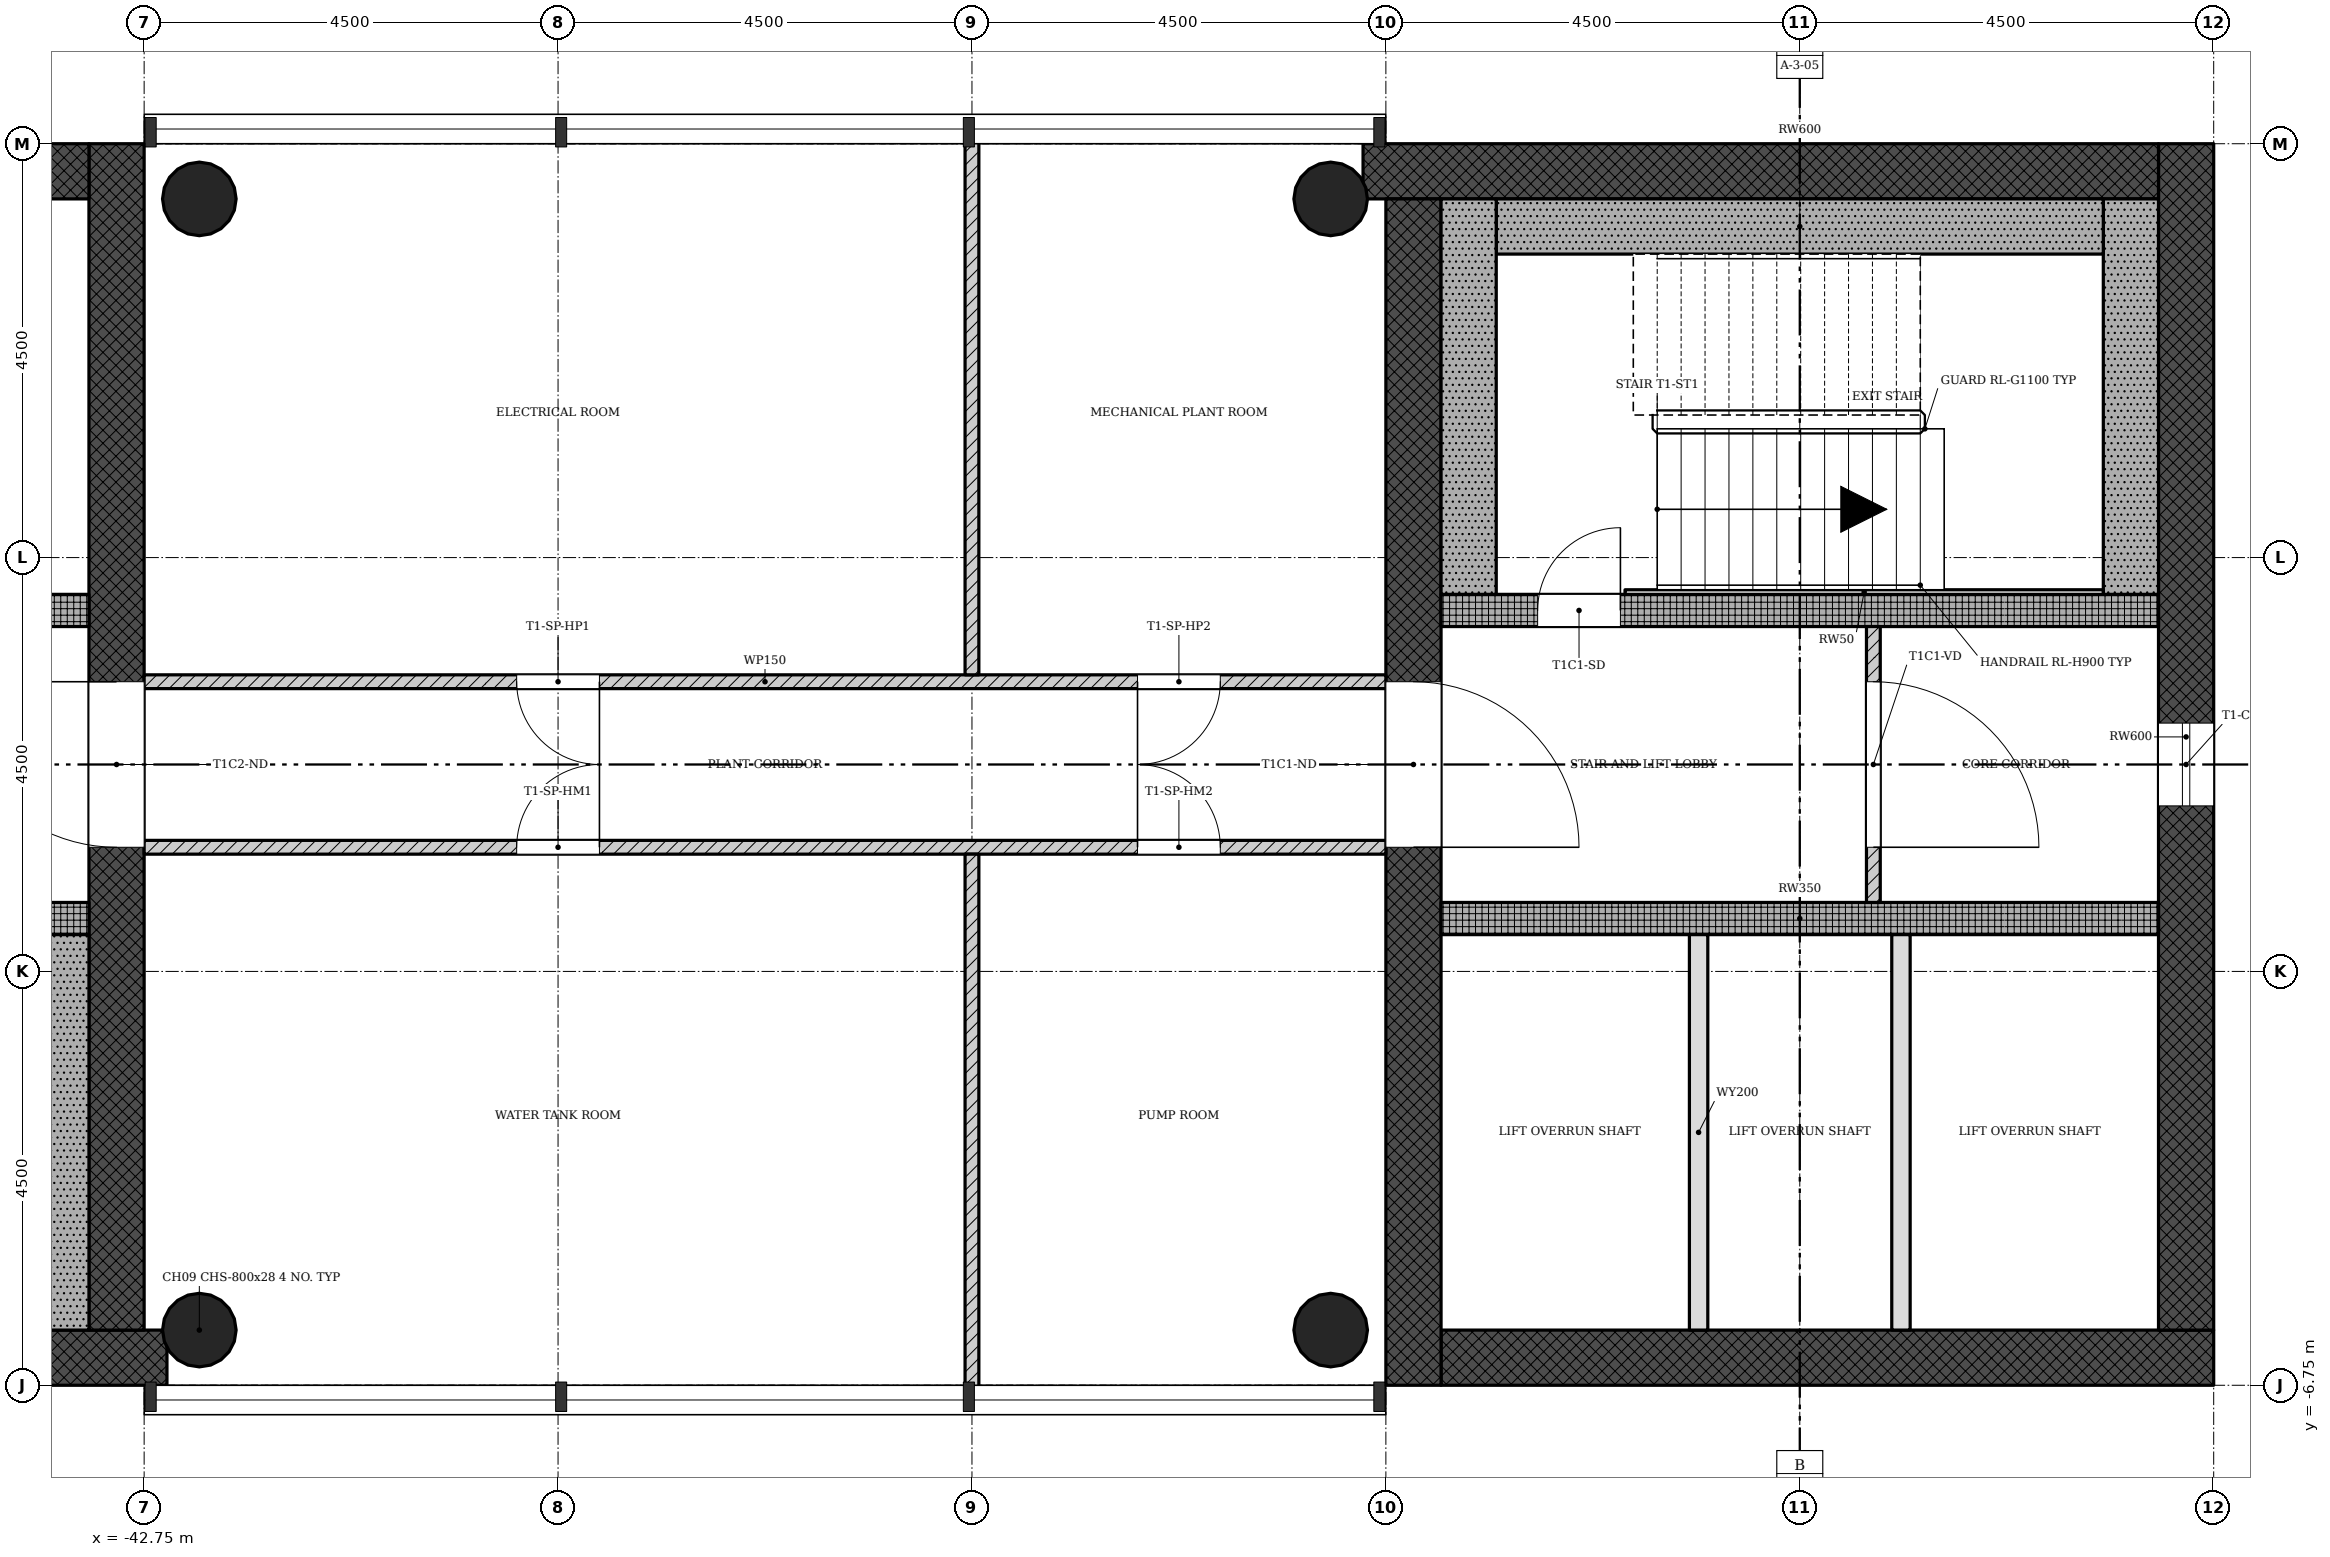
"""IFC4 building model, lengths in metres.
Left out: names, types, materials, properties, quantities, classifications, styles, units other than length and angle.
Written with IfcOpenShell. Run it as: python <this file> out.ifc"""

import sys

from ifc_helpers import new_model, si_unit, direction, frame, frame_2d, origin, origin_2d, place, context, subcontext, project, spatial, rectangle, hollow_circle, extrude, element, fill, save


model = new_model("IFC4")
c1 = context("Model", 3, precision=1e-05, world=origin(), true_north=direction((0.0, 1.0)))
c2 = subcontext(c1, "Body", "Model", "MODEL_VIEW")
j1 = project(units=[si_unit("LENGTHUNIT", "METRE"), si_unit("PLANEANGLEUNIT", "RADIAN")], contexts=[c1])
p1 = place(None, origin())
s1 = spatial("IfcSite", under=j1, at=p1, CompositionType="ELEMENT")
p2 = place(p1, origin())
s2 = spatial("IfcBuilding", under=s1, at=p2, CompositionType="ELEMENT")
p3 = place(p2, frame((0.0, 0.0, 251.4)))
s3 = spatial("IfcBuildingStorey", under=s2, at=p3, CompositionType="ELEMENT", Elevation=251.4)
p4 = place(p3, frame((-28.65, -6.45, 0.0), z_axis=(0.0, 0.0, 1.0), x_axis=(1.0, 0.0, 0.0)))
e1 = element("IfcWall", 1, at=p4, inside=s3, PredefinedType="SHEAR", context=c2, shape_type="SweptSolid", body=[
    extrude(rectangle(XDim=8.4, YDim=0.6, at=frame_2d((4.2, 0.0))), origin(), (0.0, 0.0, 1.0), 4.5),
])
p5 = place(p3, frame((-20.55, -6.15, 0.0), z_axis=(0.0, 0.0, 1.0), x_axis=(0.0, 1.0, 0.0)))
e2 = element("IfcWall", 2, at=p5, inside=s3, PredefinedType="SHEAR", context=c2, shape_type="SweptSolid", body=[
    extrude(rectangle(XDim=12.9, YDim=0.6, at=frame_2d((6.45, 0.0))), origin(), (0.0, 0.0, 1.0), 4.5),
])
p6 = place(p5, frame((5.7, 0.0, 0.45)))
e3 = element("IfcOpeningElement", 3, at=p6, cuts=e2, PredefinedType="OPENING", context=c2, shape_type="SweptSolid", body=[
    extrude(rectangle(XDim=0.9, YDim=2.4, at=frame_2d((0.45, 1.2))), frame((0.0, 0.31, 0.0), z_axis=(0.0, -1.0, 0.0), x_axis=(1.0, 0.0, 0.0)), (0.0, 0.0, 1.0), 0.62),
])
p7 = place(p3, frame((-20.85, 6.45, 0.0), z_axis=(0.0, 0.0, 1.0), x_axis=(-1.0, 0.0, 0.0)))
e4 = element("IfcWall", 4, at=p7, inside=s3, PredefinedType="SHEAR", context=c2, shape_type="SweptSolid", body=[
    extrude(rectangle(XDim=8.648, YDim=0.6, at=frame_2d((4.324, 0.0))), origin(), (0.0, 0.0, 1.0), 4.5),
])
p8 = place(p3, frame((-28.95, 6.15, 0.0), z_axis=(0.0, 0.0, 1.0), x_axis=(0.0, -1.0, 0.0)))
e5 = element("IfcWall", 5, at=p8, inside=s3, PredefinedType="SHEAR", context=c2, shape_type="SweptSolid", body=[
    extrude(rectangle(XDim=12.9, YDim=0.6, at=frame_2d((6.45, 0.0))), origin(), (0.0, 0.0, 1.0), 4.5),
])
p9 = place(p8, frame((5.25, 0.0, 0.0)))
e6 = element("IfcOpeningElement", 6, at=p9, cuts=e5, PredefinedType="OPENING", context=c2, shape_type="SweptSolid", body=[
    extrude(rectangle(XDim=1.8, YDim=2.1, at=frame_2d((0.9, 1.05))), frame((0.0, 0.31, 0.0), z_axis=(0.0, -1.0, 0.0), x_axis=(1.0, 0.0, 0.0)), (0.0, 0.0, 1.0), 0.62),
])
p10 = place(p3, frame((-28.65, -1.675, 0.0), z_axis=(0.0, 0.0, 1.0), x_axis=(1.0, 0.0, 0.0)))
e7 = element("IfcWall", 7, at=p10, inside=s3, PredefinedType="SHEAR", context=c2, shape_type="SweptSolid", body=[
    extrude(rectangle(XDim=7.8, YDim=0.35, at=frame_2d((3.9, 0.0))), origin(), (0.0, 0.0, 1.0), 4.5),
])
p11 = place(p3, frame((-28.65, 1.675, 0.0), z_axis=(0.0, 0.0, 1.0), x_axis=(1.0, 0.0, 0.0)))
e8 = element("IfcWall", 8, at=p11, inside=s3, PredefinedType="SHEAR", context=c2, shape_type="SweptSolid", body=[
    extrude(rectangle(XDim=7.8, YDim=0.35, at=frame_2d((3.9, 0.0))), origin(), (0.0, 0.0, 1.0), 4.5),
])
p12 = place(p11, frame((1.05, 0.0, 0.0)))
e9 = element("IfcOpeningElement", 9, at=p12, cuts=e8, PredefinedType="OPENING", context=c2, shape_type="SweptSolid", body=[
    extrude(rectangle(XDim=0.9, YDim=2.1, at=frame_2d((0.45, 1.05))), frame((0.0, 0.185, 0.0), z_axis=(0.0, -1.0, 0.0), x_axis=(1.0, 0.0, 0.0)), (0.0, 0.0, 1.0), 0.37),
])
p13 = place(p3, frame((-51.15, -6.45, 0.0), z_axis=(0.0, 0.0, 1.0), x_axis=(1.0, 0.0, 0.0)))
e10 = element("IfcWall", 10, at=p13, inside=s3, PredefinedType="SHEAR", context=c2, shape_type="SweptSolid", body=[
    extrude(rectangle(XDim=8.648, YDim=0.6, at=frame_2d((4.324, 0.0))), origin(), (0.0, 0.0, 1.0), 4.5),
])
p14 = place(p3, frame((-43.05, -6.15, 0.0), z_axis=(0.0, 0.0, 1.0), x_axis=(0.0, 1.0, 0.0)))
e11 = element("IfcWall", 11, at=p14, inside=s3, PredefinedType="SHEAR", context=c2, shape_type="SweptSolid", body=[
    extrude(rectangle(XDim=12.9, YDim=0.6, at=frame_2d((6.45, 0.0))), origin(), (0.0, 0.0, 1.0), 4.5),
])
p15 = place(p14, frame((5.25, 0.0, 0.0)))
e12 = element("IfcOpeningElement", 12, at=p15, cuts=e11, PredefinedType="OPENING", context=c2, shape_type="SweptSolid", body=[
    extrude(rectangle(XDim=1.8, YDim=2.1, at=frame_2d((0.9, 1.05))), frame((0.0, 0.31, 0.0), z_axis=(0.0, -1.0, 0.0), x_axis=(1.0, 0.0, 0.0)), (0.0, 0.0, 1.0), 0.62),
])
p16 = place(p3, frame((-43.35, 6.45, 0.0), z_axis=(0.0, 0.0, 1.0), x_axis=(-1.0, 0.0, 0.0)))
e13 = element("IfcWall", 13, at=p16, inside=s3, PredefinedType="SHEAR", context=c2, shape_type="SweptSolid", body=[
    extrude(rectangle(XDim=8.4, YDim=0.6, at=frame_2d((4.2, 0.0))), origin(), (0.0, 0.0, 1.0), 4.5),
])
p17 = place(p3, frame((-51.15, -1.675, 0.0), z_axis=(0.0, 0.0, 1.0), x_axis=(1.0, 0.0, 0.0)))
e14 = element("IfcWall", 14, at=p17, inside=s3, PredefinedType="SHEAR", context=c2, shape_type="SweptSolid", body=[
    extrude(rectangle(XDim=7.8, YDim=0.35, at=frame_2d((3.9, 0.0))), origin(), (0.0, 0.0, 1.0), 4.5),
])
p18 = place(p17, frame((5.85, 0.0, 0.0)))
e15 = element("IfcOpeningElement", 15, at=p18, cuts=e14, PredefinedType="OPENING", context=c2, shape_type="SweptSolid", body=[
    extrude(rectangle(XDim=0.9, YDim=2.1, at=frame_2d((0.45, 1.05))), frame((0.0, 0.185, 0.0), z_axis=(0.0, -1.0, 0.0), x_axis=(1.0, 0.0, 0.0)), (0.0, 0.0, 1.0), 0.37),
])
p19 = place(p3, frame((-51.15, 1.675, 0.0), z_axis=(0.0, 0.0, 1.0), x_axis=(1.0, 0.0, 0.0)))
e16 = element("IfcWall", 16, at=p19, inside=s3, PredefinedType="SHEAR", context=c2, shape_type="SweptSolid", body=[
    extrude(rectangle(XDim=7.8, YDim=0.35, at=frame_2d((3.9, 0.0))), origin(), (0.0, 0.0, 1.0), 4.5),
])
p20 = place(p19, frame((5.55, 0.0, 0.0)))
e17 = element("IfcOpeningElement", 17, at=p20, cuts=e16, PredefinedType="OPENING", context=c2, shape_type="SweptSolid", body=[
    extrude(rectangle(XDim=1.1, YDim=2.1, at=frame_2d((0.55, 1.05))), frame((0.0, 0.185, 0.0), z_axis=(0.0, -1.0, 0.0), x_axis=(1.0, 0.0, 0.0)), (0.0, 0.0, 1.0), 0.37),
])
p21 = place(p19, frame((3.5, 0.0, 0.0)))
e18 = element("IfcOpeningElement", 18, at=p21, cuts=e16, PredefinedType="OPENING", context=c2, shape_type="SweptSolid", body=[
    extrude(rectangle(XDim=0.9, YDim=2.1, at=frame_2d((0.45, 1.05))), frame((0.0, 0.185, 0.0), z_axis=(0.0, -1.0, 0.0), x_axis=(1.0, 0.0, 0.0)), (0.0, 0.0, 1.0), 0.37),
])
for number, where, z_axis, x_axis in (
    (19, (-42.15, -6.15, 0.0), (0.0, 0.0, 1.0), (1.0, 0.0, 0.0)),
    (20, (-29.85, -6.15, 0.0), (0.0, 0.0, 1.0), (1.0, 0.0, 0.0)),
    (21, (-29.85, 6.15, 0.0), (0.0, 0.0, 1.0), (1.0, 0.0, 0.0)),
    (22, (-42.15, 6.15, 0.0), (0.0, 0.0, 1.0), (1.0, 0.0, 0.0)),
):
    element("IfcColumn", number, at=place(p3, frame(where, z_axis=z_axis, x_axis=x_axis)), inside=s3, PredefinedType="COLUMN", context=c2, shape_type="SweptSolid", body=[
        extrude(hollow_circle(Radius=0.4, WallThickness=0.028, at=origin_2d()), origin(), (0.0, 0.0, 1.0), 4.5),
    ])
p22 = place(p3, frame((-23.95, -1.5, 0.0), z_axis=(0.0, 0.0, 1.0), x_axis=(0.0, 1.0, 0.0)))
e23 = element("IfcWall", 23, at=p22, inside=s3, PredefinedType="PARTITIONING", context=c2, shape_type="SweptSolid", body=[
    extrude(rectangle(XDim=3.0, YDim=0.15, at=frame_2d((1.5, 0.0))), origin(), (0.0, 0.0, 1.0), 4.1),
])
p23 = place(p22, frame((0.6, 0.0, 0.0)))
e24 = element("IfcOpeningElement", 24, at=p23, cuts=e23, PredefinedType="OPENING", context=c2, shape_type="SweptSolid", body=[
    extrude(rectangle(XDim=1.8, YDim=2.1, at=frame_2d((0.9, 1.05))), frame((0.0, 0.085, 0.0), z_axis=(0.0, -1.0, 0.0), x_axis=(1.0, 0.0, 0.0)), (0.0, 0.0, 1.0), 0.17),
])
for number, where, z_axis, x_axis in (
    (25, (-25.85, -6.15, 0.0), (0.0, 0.0, 1.0), (0.0, 1.0, 0.0)),
    (26, (-23.65, -6.15, 0.0), (0.0, 0.0, 1.0), (0.0, 1.0, 0.0)),
):
    element("IfcWall", number, at=place(p3, frame(where, z_axis=z_axis, x_axis=x_axis)), inside=s3, PredefinedType="SOLIDWALL", context=c2, shape_type="SweptSolid", body=[
        extrude(rectangle(XDim=4.3, YDim=0.2, at=frame_2d((2.15, 0.0))), origin(), (0.0, 0.0, 1.0), 4.1),
    ])
p24 = place(p3, frame((-42.75, 0.9, 0.0), z_axis=(0.0, 0.0, 1.0), x_axis=(1.0, 0.0, 0.0)))
e27 = element("IfcWall", 27, at=p24, inside=s3, PredefinedType="PARTITIONING", context=c2, shape_type="SweptSolid", body=[
    extrude(rectangle(XDim=13.5, YDim=0.15, at=frame_2d((6.75, 0.0))), origin(), (0.0, 0.0, 1.0), 4.1),
])
p25 = place(p24, frame((4.05, 0.0, 0.0)))
e28 = element("IfcOpeningElement", 28, at=p25, cuts=e27, PredefinedType="OPENING", context=c2, shape_type="SweptSolid", body=[
    extrude(rectangle(XDim=0.9, YDim=2.1, at=frame_2d((0.45, 1.05))), frame((0.0, 0.085, 0.0), z_axis=(0.0, -1.0, 0.0), x_axis=(1.0, 0.0, 0.0)), (0.0, 0.0, 1.0), 0.17),
])
p26 = place(p24, frame((10.8, 0.0, 0.0)))
e29 = element("IfcOpeningElement", 29, at=p26, cuts=e27, PredefinedType="OPENING", context=c2, shape_type="SweptSolid", body=[
    extrude(rectangle(XDim=0.9, YDim=2.1, at=frame_2d((0.45, 1.05))), frame((0.0, 0.085, 0.0), z_axis=(0.0, -1.0, 0.0), x_axis=(1.0, 0.0, 0.0)), (0.0, 0.0, 1.0), 0.17),
])
p27 = place(p3, frame((-33.75, 0.975, 0.0), z_axis=(0.0, 0.0, 1.0), x_axis=(0.0, 1.0, 0.0)))
e30 = element("IfcWall", 30, at=p27, inside=s3, PredefinedType="PARTITIONING", context=c2, shape_type="SweptSolid", body=[
    extrude(rectangle(XDim=5.875, YDim=0.15, at=frame_2d((2.938, 0.0))), origin(), (0.0, 0.0, 1.0), 4.1),
])
p28 = place(p3, frame((-42.75, -0.9, 0.0), z_axis=(0.0, 0.0, 1.0), x_axis=(1.0, 0.0, 0.0)))
e31 = element("IfcWall", 31, at=p28, inside=s3, PredefinedType="PARTITIONING", context=c2, shape_type="SweptSolid", body=[
    extrude(rectangle(XDim=13.5, YDim=0.15, at=frame_2d((6.75, 0.0))), origin(), (0.0, 0.0, 1.0), 4.1),
])
p29 = place(p28, frame((4.05, 0.0, 0.0)))
e32 = element("IfcOpeningElement", 32, at=p29, cuts=e31, PredefinedType="OPENING", context=c2, shape_type="SweptSolid", body=[
    extrude(rectangle(XDim=0.9, YDim=2.1, at=frame_2d((0.45, 1.05))), frame((0.0, 0.085, 0.0), z_axis=(0.0, -1.0, 0.0), x_axis=(1.0, 0.0, 0.0)), (0.0, 0.0, 1.0), 0.17),
])
p30 = place(p28, frame((10.8, 0.0, 0.0)))
e33 = element("IfcOpeningElement", 33, at=p30, cuts=e31, PredefinedType="OPENING", context=c2, shape_type="SweptSolid", body=[
    extrude(rectangle(XDim=0.9, YDim=2.1, at=frame_2d((0.45, 1.05))), frame((0.0, 0.085, 0.0), z_axis=(0.0, -1.0, 0.0), x_axis=(1.0, 0.0, 0.0)), (0.0, 0.0, 1.0), 0.17),
])
p31 = place(p3, frame((-33.75, -0.975, 0.0), z_axis=(0.0, 0.0, 1.0), x_axis=(0.0, -1.0, 0.0)))
e34 = element("IfcWall", 34, at=p31, inside=s3, PredefinedType="PARTITIONING", context=c2, shape_type="SweptSolid", body=[
    extrude(rectangle(XDim=5.875, YDim=0.15, at=frame_2d((2.938, 0.0))), origin(), (0.0, 0.0, 1.0), 4.1),
])
p32 = place(p3, frame((-21.15, 1.85, 0.0), z_axis=(0.0, 0.0, 1.0), x_axis=(0.0, 1.0, 0.0)))
e35 = element("IfcWall", 35, at=p32, inside=s3, PredefinedType="SHEAR", context=c2, shape_type="SweptSolid", body=[
    extrude(rectangle(XDim=4.3, YDim=0.6, at=frame_2d((2.15, 0.0))), origin(), (0.0, 0.0, 1.0), 4.5),
])
p33 = place(p3, frame((-28.05, 5.85, 0.0), z_axis=(0.0, 0.0, 1.0), x_axis=(1.0, 0.0, 0.0)))
e36 = element("IfcWall", 36, at=p33, inside=s3, PredefinedType="SHEAR", context=c2, shape_type="SweptSolid", body=[
    extrude(rectangle(XDim=6.6, YDim=0.6, at=frame_2d((3.3, 0.0))), origin(), (0.0, 0.0, 1.0), 4.5),
])
p34 = place(p3, frame((-28.35, 1.85, 0.0), z_axis=(0.0, 0.0, 1.0), x_axis=(0.0, 1.0, 0.0)))
e37 = element("IfcWall", 37, at=p34, inside=s3, PredefinedType="SHEAR", context=c2, shape_type="SweptSolid", body=[
    extrude(rectangle(XDim=4.3, YDim=0.6, at=frame_2d((2.15, 0.0))), origin(), (0.0, 0.0, 1.0), 4.5),
])
p35 = place(p3, frame((-26.65, 1.875, 0.0), z_axis=(0.0, 0.0, 1.0), x_axis=(1.0, 0.0, 0.0)))
e38 = element("IfcWall", 38, at=p35, inside=s3, PredefinedType="SHEAR", context=c2, shape_type="SweptSolid", body=[
    extrude(rectangle(XDim=5.2, YDim=0.05, at=frame_2d((2.6, 0.0))), origin(), (0.0, 0.0, 1.0), 4.5),
])
p36 = place(p3, frame((-43.65, -1.85, 0.0), z_axis=(0.0, 0.0, 1.0), x_axis=(0.0, -1.0, 0.0)))
e39 = element("IfcWall", 39, at=p36, inside=s3, PredefinedType="SHEAR", context=c2, shape_type="SweptSolid", body=[
    extrude(rectangle(XDim=4.3, YDim=0.6, at=frame_2d((2.15, 0.0))), origin(), (0.0, 0.0, 1.0), 4.5),
])
p37 = place(p6, origin())
e40 = element("IfcWindow", 40, at=p37, inside=s3, PartitioningType="SINGLE_PANEL", PredefinedType="WINDOW", context=c2, shape_type="SweptSolid", body=[
    extrude(rectangle(XDim=0.9, YDim=2.4, at=frame_2d((0.45, 1.2))), frame((0.0, 0.03, 0.0), z_axis=(0.0, -1.0, 0.0), x_axis=(1.0, 0.0, 0.0)), (0.0, 0.0, 1.0), 0.06),
])
fill(e3, e40)
p38 = place(p23, origin())
e41 = element("IfcDoor", 41, at=p38, inside=s3, OperationType="SINGLE_SWING_LEFT", PredefinedType="DOOR", context=c2, shape_type="SweptSolid", body=[
    extrude(rectangle(XDim=1.8, YDim=2.1, at=frame_2d((0.9, 1.05))), frame((0.0, 0.025, 0.0), z_axis=(0.0, -1.0, 0.0), x_axis=(1.0, 0.0, 0.0)), (0.0, 0.0, 1.0), 0.05),
])
fill(e24, e41)
p39 = place(p25, origin())
e42 = element("IfcDoor", 42, at=p39, inside=s3, OperationType="SINGLE_SWING_RIGHT", PredefinedType="DOOR", context=c2, shape_type="SweptSolid", body=[
    extrude(rectangle(XDim=0.9, YDim=2.1, at=frame_2d((0.45, 1.05))), frame((0.0, 0.025, 0.0), z_axis=(0.0, -1.0, 0.0), x_axis=(1.0, 0.0, 0.0)), (0.0, 0.0, 1.0), 0.05),
])
fill(e28, e42)
p40 = place(p26, origin())
e43 = element("IfcDoor", 43, at=p40, inside=s3, OperationType="SINGLE_SWING_LEFT", PredefinedType="DOOR", context=c2, shape_type="SweptSolid", body=[
    extrude(rectangle(XDim=0.9, YDim=2.1, at=frame_2d((0.45, 1.05))), frame((0.0, 0.025, 0.0), z_axis=(0.0, -1.0, 0.0), x_axis=(1.0, 0.0, 0.0)), (0.0, 0.0, 1.0), 0.05),
])
fill(e29, e43)
p41 = place(p29, origin())
e44 = element("IfcDoor", 44, at=p41, inside=s3, OperationType="SINGLE_SWING_LEFT", PredefinedType="DOOR", context=c2, shape_type="SweptSolid", body=[
    extrude(rectangle(XDim=0.9, YDim=2.1, at=frame_2d((0.45, 1.05))), frame((0.0, 0.025, 0.0), z_axis=(0.0, -1.0, 0.0), x_axis=(1.0, 0.0, 0.0)), (0.0, 0.0, 1.0), 0.05),
])
fill(e32, e44)
p42 = place(p30, origin())
e45 = element("IfcDoor", 45, at=p42, inside=s3, OperationType="SINGLE_SWING_RIGHT", PredefinedType="DOOR", context=c2, shape_type="SweptSolid", body=[
    extrude(rectangle(XDim=0.9, YDim=2.1, at=frame_2d((0.45, 1.05))), frame((0.0, 0.025, 0.0), z_axis=(0.0, -1.0, 0.0), x_axis=(1.0, 0.0, 0.0)), (0.0, 0.0, 1.0), 0.05),
])
fill(e33, e45)
p43 = place(p12, origin())
e46 = element("IfcDoor", 46, at=p43, inside=s3, OperationType="SINGLE_SWING_LEFT", PredefinedType="DOOR", context=c2, shape_type="SweptSolid", body=[
    extrude(rectangle(XDim=0.9, YDim=2.1, at=frame_2d((0.45, 1.05))), frame((0.0, 0.025, 0.0), z_axis=(0.0, -1.0, 0.0), x_axis=(1.0, 0.0, 0.0)), (0.0, 0.0, 1.0), 0.05),
])
fill(e9, e46)
p44 = place(p9, origin())
e47 = element("IfcDoor", 47, at=p44, inside=s3, OperationType="SINGLE_SWING_LEFT", PredefinedType="DOOR", context=c2, shape_type="SweptSolid", body=[
    extrude(rectangle(XDim=1.8, YDim=2.1, at=frame_2d((0.9, 1.05))), frame((0.0, 0.025, 0.0), z_axis=(0.0, -1.0, 0.0), x_axis=(1.0, 0.0, 0.0)), (0.0, 0.0, 1.0), 0.05),
])
fill(e6, e47)
p45 = place(p15, origin())
e48 = element("IfcDoor", 48, at=p45, inside=s3, OperationType="SINGLE_SWING_LEFT", PredefinedType="DOOR", context=c2, shape_type="SweptSolid", body=[
    extrude(rectangle(XDim=1.8, YDim=2.1, at=frame_2d((0.9, 1.05))), frame((0.0, 0.025, 0.0), z_axis=(0.0, -1.0, 0.0), x_axis=(1.0, 0.0, 0.0)), (0.0, 0.0, 1.0), 0.05),
])
fill(e12, e48)
save(model, sys.argv[1])
